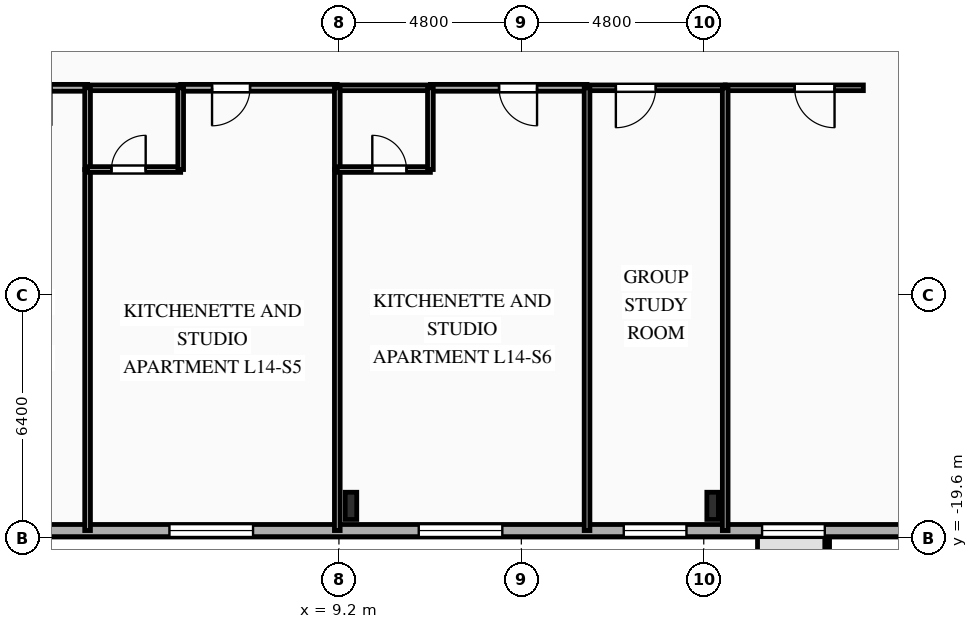
"""IFC4 building model, lengths in metres.
Left out: names, types, materials, properties, quantities, classifications, styles, units other than length and angle.
Written with IfcOpenShell. Run it as: python <this file> out.ifc"""

import sys

from ifc_helpers import new_model, si_unit, direction, frame, frame_2d, origin, origin_2d, place, context, subcontext, project, spatial, rectangle, i_section, extrude, element, fill, save


model = new_model("IFC4")
c1 = context("Model", 3, precision=1e-05, world=origin(), true_north=direction((0.0, 1.0)))
c2 = subcontext(c1, "Body", "Model", "MODEL_VIEW")
j1 = project(units=[si_unit("LENGTHUNIT", "METRE"), si_unit("PLANEANGLEUNIT", "RADIAN")], contexts=[c1])
p1 = place(None, origin())
s1 = spatial("IfcSite", under=j1, at=p1, CompositionType="ELEMENT")
p2 = place(p1, origin())
s2 = spatial("IfcBuilding", under=s1, at=p2, CompositionType="ELEMENT")
p3 = place(p2, frame((0.0, 0.0, 53.8)))
s3 = spatial("IfcBuildingStorey", under=s2, at=p3, CompositionType="ELEMENT", Elevation=53.8)
for number, where, z_axis, x_axis in (
    (1, (9.517, -18.75, 0.0), (0.0, 0.0, 1.0), (1.0, 0.0, 0.0)),
    (2, (19.033, -18.75, 0.0), (0.0, 0.0, 1.0), (1.0, 0.0, 0.0)),
):
    element("IfcColumn", number, at=place(p3, frame(where, z_axis=z_axis, x_axis=x_axis)), inside=s3, PredefinedType="COLUMN", context=c2, shape_type="SweptSolid", body=[
        extrude(i_section(OverallWidth=0.304, OverallDepth=0.716, WebThickness=0.021, FlangeThickness=0.04, FilletRadius=0.027, at=origin_2d()), origin(), (0.0, 0.0, 1.0), 3.35),
    ])
p4 = place(p3, frame((29.2, -19.4, 0.0), z_axis=(0.0, 0.0, 1.0), x_axis=(-1.0, 0.0, 0.0)))
e3 = element("IfcWall", 3, at=p4, inside=s3, PredefinedType="SOLIDWALL", context=c2, shape_type="SweptSolid", body=[
    extrude(rectangle(XDim=58.4, YDim=0.32, at=frame_2d((29.2, 0.0))), origin(), (0.0, 0.0, 1.0), 3.035),
])
p5 = place(p4, frame((7.215, 0.0, 0.85)))
e4 = element("IfcOpeningElement", 4, at=p5, cuts=e3, PredefinedType="OPENING", context=c2, shape_type="SweptSolid", body=[
    extrude(rectangle(XDim=1.65, YDim=1.85, at=frame_2d((0.825, 0.925))), frame((0.0, 0.17, 0.0), z_axis=(0.0, -1.0, 0.0), x_axis=(1.0, 0.0, 0.0)), (0.0, 0.0, 1.0), 0.34),
])
p6 = place(p4, frame((10.855, 0.0, 0.85)))
e5 = element("IfcOpeningElement", 5, at=p6, cuts=e3, PredefinedType="OPENING", context=c2, shape_type="SweptSolid", body=[
    extrude(rectangle(XDim=1.65, YDim=1.85, at=frame_2d((0.825, 0.925))), frame((0.0, 0.17, 0.0), z_axis=(0.0, -1.0, 0.0), x_axis=(1.0, 0.0, 0.0)), (0.0, 0.0, 1.0), 0.34),
])
p7 = place(p4, frame((15.7, 0.0, 0.85)))
e6 = element("IfcOpeningElement", 6, at=p7, cuts=e3, PredefinedType="OPENING", context=c2, shape_type="SweptSolid", body=[
    extrude(rectangle(XDim=2.2, YDim=1.85, at=frame_2d((1.1, 0.925))), frame((0.0, 0.17, 0.0), z_axis=(0.0, -1.0, 0.0), x_axis=(1.0, 0.0, 0.0)), (0.0, 0.0, 1.0), 0.34),
])
p8 = place(p4, frame((22.26, 0.0, 0.85)))
e7 = element("IfcOpeningElement", 7, at=p8, cuts=e3, PredefinedType="OPENING", context=c2, shape_type="SweptSolid", body=[
    extrude(rectangle(XDim=2.2, YDim=1.85, at=frame_2d((1.1, 0.925))), frame((0.0, 0.17, 0.0), z_axis=(0.0, -1.0, 0.0), x_axis=(1.0, 0.0, 0.0)), (0.0, 0.0, 1.0), 0.34),
])
p9 = place(p4, frame((29.408, 0.0, 0.85)))
e8 = element("IfcOpeningElement", 8, at=p9, cuts=e3, PredefinedType="OPENING", context=c2, shape_type="SweptSolid", body=[
    extrude(rectangle(XDim=2.2, YDim=1.85, at=frame_2d((1.1, 0.925))), frame((0.0, 0.17, 0.0), z_axis=(0.0, -1.0, 0.0), x_axis=(1.0, 0.0, 0.0)), (0.0, 0.0, 1.0), 0.34),
])
p10 = place(p4, frame((35.38, 0.0, 0.85)))
e9 = element("IfcOpeningElement", 9, at=p10, cuts=e3, PredefinedType="OPENING", context=c2, shape_type="SweptSolid", body=[
    extrude(rectangle(XDim=2.2, YDim=1.85, at=frame_2d((1.1, 0.925))), frame((0.0, 0.17, 0.0), z_axis=(0.0, -1.0, 0.0), x_axis=(1.0, 0.0, 0.0)), (0.0, 0.0, 1.0), 0.34),
])
p11 = place(p4, frame((41.98, 0.0, 0.85)))
e10 = element("IfcOpeningElement", 10, at=p11, cuts=e3, PredefinedType="OPENING", context=c2, shape_type="SweptSolid", body=[
    extrude(rectangle(XDim=2.2, YDim=1.85, at=frame_2d((1.1, 0.925))), frame((0.0, 0.17, 0.0), z_axis=(0.0, -1.0, 0.0), x_axis=(1.0, 0.0, 0.0)), (0.0, 0.0, 1.0), 0.34),
])
p12 = place(p4, frame((48.495, 0.0, 0.85)))
e11 = element("IfcOpeningElement", 11, at=p12, cuts=e3, PredefinedType="OPENING", context=c2, shape_type="SweptSolid", body=[
    extrude(rectangle(XDim=1.65, YDim=1.85, at=frame_2d((0.825, 0.925))), frame((0.0, 0.17, 0.0), z_axis=(0.0, -1.0, 0.0), x_axis=(1.0, 0.0, 0.0)), (0.0, 0.0, 1.0), 0.34),
])
p13 = place(p3, frame((2.586, -7.75, 0.0), z_axis=(0.0, 0.0, 1.0), x_axis=(-1.0, 0.0, 0.0)))
e12 = element("IfcWall", 12, at=p13, inside=s3, PredefinedType="PARTITIONING", context=c2, shape_type="SweptSolid", body=[
    extrude(rectangle(XDim=2.586, YDim=0.18, at=frame_2d((1.293, 0.0))), origin(), (0.0, 0.0, 1.0), 3.035),
])
p14 = place(p13, frame((0.953, 0.0, 0.0)))
e13 = element("IfcOpeningElement", 13, at=p14, cuts=e12, PredefinedType="OPENING", context=c2, shape_type="SweptSolid", body=[
    extrude(rectangle(XDim=1.0, YDim=2.15, at=frame_2d((0.5, 1.075))), frame((0.0, 0.1, 0.0), z_axis=(0.0, -1.0, 0.0), x_axis=(1.0, 0.0, 0.0)), (0.0, 0.0, 1.0), 0.2),
])
p15 = place(p3, frame((9.157, -7.75, 0.0), z_axis=(0.0, 0.0, 1.0), x_axis=(-1.0, 0.0, 0.0)))
e14 = element("IfcWall", 14, at=p15, inside=s3, PredefinedType="PARTITIONING", context=c2, shape_type="SweptSolid", body=[
    extrude(rectangle(XDim=4.121, YDim=0.18, at=frame_2d((2.061, 0.0))), origin(), (0.0, 0.0, 1.0), 3.035),
])
p16 = place(p15, frame((2.296, 0.0, 0.0)))
e15 = element("IfcOpeningElement", 15, at=p16, cuts=e14, PredefinedType="OPENING", context=c2, shape_type="SweptSolid", body=[
    extrude(rectangle(XDim=1.0, YDim=2.15, at=frame_2d((0.5, 1.075))), frame((0.0, 0.1, 0.0), z_axis=(0.0, -1.0, 0.0), x_axis=(1.0, 0.0, 0.0)), (0.0, 0.0, 1.0), 0.2),
])
p17 = place(p3, frame((5.036, -7.75, 0.0), z_axis=(0.0, 0.0, 1.0), x_axis=(-1.0, 0.0, 0.0)))
e16 = element("IfcWall", 16, at=p17, inside=s3, PredefinedType="PLUMBINGWALL", context=c2, shape_type="SweptSolid", body=[
    extrude(rectangle(XDim=2.45, YDim=0.15, at=frame_2d((1.225, 0.0))), origin(), (0.0, 0.0, 1.0), 3.035),
])
p18 = place(p3, frame((15.729, -7.75, 0.0), z_axis=(0.0, 0.0, 1.0), x_axis=(-1.0, 0.0, 0.0)))
e17 = element("IfcWall", 17, at=p18, inside=s3, PredefinedType="PARTITIONING", context=c2, shape_type="SweptSolid", body=[
    extrude(rectangle(XDim=4.122, YDim=0.18, at=frame_2d((2.061, 0.0))), origin(), (0.0, 0.0, 1.0), 3.035),
])
p19 = place(p18, frame((1.316, 0.0, 0.0)))
e18 = element("IfcOpeningElement", 18, at=p19, cuts=e17, PredefinedType="OPENING", context=c2, shape_type="SweptSolid", body=[
    extrude(rectangle(XDim=1.0, YDim=2.15, at=frame_2d((0.5, 1.075))), frame((0.0, 0.1, 0.0), z_axis=(0.0, -1.0, 0.0), x_axis=(1.0, 0.0, 0.0)), (0.0, 0.0, 1.0), 0.2),
])
p20 = place(p3, frame((11.607, -7.75, 0.0), z_axis=(0.0, 0.0, 1.0), x_axis=(-1.0, 0.0, 0.0)))
e19 = element("IfcWall", 19, at=p20, inside=s3, PredefinedType="PLUMBINGWALL", context=c2, shape_type="SweptSolid", body=[
    extrude(rectangle(XDim=2.45, YDim=0.15, at=frame_2d((1.225, 0.0))), origin(), (0.0, 0.0, 1.0), 3.035),
])
p21 = place(p3, frame((19.365, -7.75, 0.0), z_axis=(0.0, 0.0, 1.0), x_axis=(-1.0, 0.0, 0.0)))
e20 = element("IfcWall", 20, at=p21, inside=s3, PredefinedType="PARTITIONING", context=c2, shape_type="SweptSolid", body=[
    extrude(rectangle(XDim=3.635, YDim=0.15, at=frame_2d((1.818, 0.0))), origin(), (0.0, 0.0, 1.0), 3.035),
])
p22 = place(p21, frame((1.827, 0.0, 0.0)))
e21 = element("IfcOpeningElement", 21, at=p22, cuts=e20, PredefinedType="OPENING", context=c2, shape_type="SweptSolid", body=[
    extrude(rectangle(XDim=1.05, YDim=2.15, at=frame_2d((0.525, 1.075))), frame((0.0, 0.085, 0.0), z_axis=(0.0, -1.0, 0.0), x_axis=(1.0, 0.0, 0.0)), (0.0, 0.0, 1.0), 0.17),
])
p23 = place(p3, frame((23.0, -7.75, 0.0), z_axis=(0.0, 0.0, 1.0), x_axis=(-1.0, 0.0, 0.0)))
e22 = element("IfcWall", 22, at=p23, inside=s3, PredefinedType="PARTITIONING", context=c2, shape_type="SweptSolid", body=[
    extrude(rectangle(XDim=3.635, YDim=0.15, at=frame_2d((1.818, 0.0))), origin(), (0.0, 0.0, 1.0), 3.035),
])
p24 = place(p23, frame((0.758, 0.0, 0.0)))
e23 = element("IfcOpeningElement", 23, at=p24, cuts=e22, PredefinedType="OPENING", context=c2, shape_type="SweptSolid", body=[
    extrude(rectangle(XDim=1.05, YDim=2.15, at=frame_2d((0.525, 1.075))), frame((0.0, 0.085, 0.0), z_axis=(0.0, -1.0, 0.0), x_axis=(1.0, 0.0, 0.0)), (0.0, 0.0, 1.0), 0.17),
])
p25 = place(p3, frame((2.586, -9.9, 0.0), z_axis=(0.0, 0.0, 1.0), x_axis=(0.0, -1.0, 0.0)))
e24 = element("IfcWall", 24, at=p25, inside=s3, PredefinedType="PARTITIONING", context=c2, shape_type="SweptSolid", body=[
    extrude(rectangle(XDim=9.5, YDim=0.15, at=frame_2d((4.75, 0.0))), origin(), (0.0, 0.0, 1.0), 3.035),
])
p26 = place(p3, frame((2.586, -7.75, 0.0), z_axis=(0.0, 0.0, 1.0), x_axis=(0.0, -1.0, 0.0)))
e25 = element("IfcWall", 25, at=p26, inside=s3, PredefinedType="PLUMBINGWALL", context=c2, shape_type="SweptSolid", body=[
    extrude(rectangle(XDim=2.15, YDim=0.15, at=frame_2d((1.075, 0.0))), origin(), (0.0, 0.0, 1.0), 3.035),
])
p27 = place(p3, frame((2.586, -9.9, 0.0), z_axis=(0.0, 0.0, 1.0), x_axis=(1.0, 0.0, 0.0)))
e26 = element("IfcWall", 26, at=p27, inside=s3, PredefinedType="PLUMBINGWALL", context=c2, shape_type="SweptSolid", body=[
    extrude(rectangle(XDim=2.45, YDim=0.15, at=frame_2d((1.225, 0.0))), origin(), (0.0, 0.0, 1.0), 3.035),
])
p28 = place(p27, frame((0.629, 0.0, 0.0)))
e27 = element("IfcOpeningElement", 27, at=p28, cuts=e26, PredefinedType="OPENING", context=c2, shape_type="SweptSolid", body=[
    extrude(rectangle(XDim=0.9, YDim=2.1, at=frame_2d((0.45, 1.05))), frame((0.0, 0.085, 0.0), z_axis=(0.0, -1.0, 0.0), x_axis=(1.0, 0.0, 0.0)), (0.0, 0.0, 1.0), 0.17),
])
p29 = place(p3, frame((5.036, -9.9, 0.0), z_axis=(0.0, 0.0, 1.0), x_axis=(0.0, 1.0, 0.0)))
e28 = element("IfcWall", 28, at=p29, inside=s3, PredefinedType="PLUMBINGWALL", context=c2, shape_type="SweptSolid", body=[
    extrude(rectangle(XDim=2.15, YDim=0.15, at=frame_2d((1.075, 0.0))), origin(), (0.0, 0.0, 1.0), 3.035),
])
p30 = place(p3, frame((9.157, -9.9, 0.0), z_axis=(0.0, 0.0, 1.0), x_axis=(0.0, -1.0, 0.0)))
e29 = element("IfcWall", 29, at=p30, inside=s3, PredefinedType="PARTITIONING", context=c2, shape_type="SweptSolid", body=[
    extrude(rectangle(XDim=9.5, YDim=0.15, at=frame_2d((4.75, 0.0))), origin(), (0.0, 0.0, 1.0), 2.52),
])
p31 = place(p3, frame((9.157, -7.75, 0.0), z_axis=(0.0, 0.0, 1.0), x_axis=(0.0, -1.0, 0.0)))
e30 = element("IfcWall", 30, at=p31, inside=s3, PredefinedType="PLUMBINGWALL", context=c2, shape_type="SweptSolid", body=[
    extrude(rectangle(XDim=2.15, YDim=0.15, at=frame_2d((1.075, 0.0))), origin(), (0.0, 0.0, 1.0), 2.52),
])
p32 = place(p3, frame((9.157, -9.9, 0.0), z_axis=(0.0, 0.0, 1.0), x_axis=(1.0, 0.0, 0.0)))
e31 = element("IfcWall", 31, at=p32, inside=s3, PredefinedType="PLUMBINGWALL", context=c2, shape_type="SweptSolid", body=[
    extrude(rectangle(XDim=2.45, YDim=0.15, at=frame_2d((1.225, 0.0))), origin(), (0.0, 0.0, 1.0), 3.035),
])
p33 = place(p32, frame((0.921, 0.0, 0.0)))
e32 = element("IfcOpeningElement", 32, at=p33, cuts=e31, PredefinedType="OPENING", context=c2, shape_type="SweptSolid", body=[
    extrude(rectangle(XDim=0.9, YDim=2.1, at=frame_2d((0.45, 1.05))), frame((0.0, 0.085, 0.0), z_axis=(0.0, -1.0, 0.0), x_axis=(1.0, 0.0, 0.0)), (0.0, 0.0, 1.0), 0.17),
])
p34 = place(p3, frame((11.607, -9.9, 0.0), z_axis=(0.0, 0.0, 1.0), x_axis=(0.0, 1.0, 0.0)))
e33 = element("IfcWall", 33, at=p34, inside=s3, PredefinedType="PLUMBINGWALL", context=c2, shape_type="SweptSolid", body=[
    extrude(rectangle(XDim=2.15, YDim=0.15, at=frame_2d((1.075, 0.0))), origin(), (0.0, 0.0, 1.0), 3.035),
])
for number, where, z_axis, x_axis in (
    (34, (15.729, -7.75, 0.0), (0.0, 0.0, 1.0), (0.0, -1.0, 0.0)),
    (35, (19.365, -7.75, 0.0), (0.0, 0.0, 1.0), (0.0, -1.0, 0.0)),
):
    element("IfcWall", number, at=place(p3, frame(where, z_axis=z_axis, x_axis=x_axis)), inside=s3, PredefinedType="PARTITIONING", context=c2, shape_type="SweptSolid", body=[
        extrude(rectangle(XDim=11.65, YDim=0.15, at=frame_2d((5.825, 0.0))), origin(), (0.0, 0.0, 1.0), 3.035),
    ])
p35 = place(p5, origin())
e36 = element("IfcWindow", 36, at=p35, inside=s3, PartitioningType="SINGLE_PANEL", PredefinedType="WINDOW", context=c2, shape_type="SweptSolid", body=[
    extrude(rectangle(XDim=1.65, YDim=1.85, at=frame_2d((0.825, 0.925))), frame((0.0, 0.03, 0.0), z_axis=(0.0, -1.0, 0.0), x_axis=(1.0, 0.0, 0.0)), (0.0, 0.0, 1.0), 0.06),
])
fill(e4, e36)
p36 = place(p6, origin())
e37 = element("IfcWindow", 37, at=p36, inside=s3, PartitioningType="SINGLE_PANEL", PredefinedType="WINDOW", context=c2, shape_type="SweptSolid", body=[
    extrude(rectangle(XDim=1.65, YDim=1.85, at=frame_2d((0.825, 0.925))), frame((0.0, 0.03, 0.0), z_axis=(0.0, -1.0, 0.0), x_axis=(1.0, 0.0, 0.0)), (0.0, 0.0, 1.0), 0.06),
])
fill(e5, e37)
p37 = place(p7, origin())
e38 = element("IfcWindow", 38, at=p37, inside=s3, PartitioningType="SINGLE_PANEL", PredefinedType="WINDOW", context=c2, shape_type="SweptSolid", body=[
    extrude(rectangle(XDim=2.2, YDim=1.85, at=frame_2d((1.1, 0.925))), frame((0.0, 0.03, 0.0), z_axis=(0.0, -1.0, 0.0), x_axis=(1.0, 0.0, 0.0)), (0.0, 0.0, 1.0), 0.06),
])
fill(e6, e38)
p38 = place(p8, origin())
e39 = element("IfcWindow", 39, at=p38, inside=s3, PartitioningType="SINGLE_PANEL", PredefinedType="WINDOW", context=c2, shape_type="SweptSolid", body=[
    extrude(rectangle(XDim=2.2, YDim=1.85, at=frame_2d((1.1, 0.925))), frame((0.0, 0.03, 0.0), z_axis=(0.0, -1.0, 0.0), x_axis=(1.0, 0.0, 0.0)), (0.0, 0.0, 1.0), 0.06),
])
fill(e7, e39)
p39 = place(p16, origin())
e40 = element("IfcDoor", 40, at=p39, inside=s3, OperationType="SINGLE_SWING_RIGHT", PredefinedType="DOOR", context=c2, shape_type="SweptSolid", body=[
    extrude(rectangle(XDim=1.0, YDim=2.15, at=frame_2d((0.5, 1.075))), frame((0.0, 0.025, 0.0), z_axis=(0.0, -1.0, 0.0), x_axis=(1.0, 0.0, 0.0)), (0.0, 0.0, 1.0), 0.05),
])
fill(e15, e40)
p40 = place(p19, origin())
e41 = element("IfcDoor", 41, at=p40, inside=s3, OperationType="SINGLE_SWING_LEFT", PredefinedType="DOOR", context=c2, shape_type="SweptSolid", body=[
    extrude(rectangle(XDim=1.0, YDim=2.15, at=frame_2d((0.5, 1.075))), frame((0.0, 0.025, 0.0), z_axis=(0.0, -1.0, 0.0), x_axis=(1.0, 0.0, 0.0)), (0.0, 0.0, 1.0), 0.05),
])
fill(e18, e41)
p41 = place(p22, origin())
e42 = element("IfcDoor", 42, at=p41, inside=s3, OperationType="SINGLE_SWING_RIGHT", PredefinedType="DOOR", context=c2, shape_type="SweptSolid", body=[
    extrude(rectangle(XDim=1.05, YDim=2.15, at=frame_2d((0.525, 1.075))), frame((0.0, 0.025, 0.0), z_axis=(0.0, -1.0, 0.0), x_axis=(1.0, 0.0, 0.0)), (0.0, 0.0, 1.0), 0.05),
])
fill(e21, e42)
p42 = place(p24, origin())
e43 = element("IfcDoor", 43, at=p42, inside=s3, OperationType="SINGLE_SWING_LEFT", PredefinedType="DOOR", context=c2, shape_type="SweptSolid", body=[
    extrude(rectangle(XDim=1.05, YDim=2.15, at=frame_2d((0.525, 1.075))), frame((0.0, 0.025, 0.0), z_axis=(0.0, -1.0, 0.0), x_axis=(1.0, 0.0, 0.0)), (0.0, 0.0, 1.0), 0.05),
])
fill(e23, e43)
p43 = place(p28, origin())
e44 = element("IfcDoor", 44, at=p43, inside=s3, OperationType="SINGLE_SWING_RIGHT", PredefinedType="DOOR", context=c2, shape_type="SweptSolid", body=[
    extrude(rectangle(XDim=0.9, YDim=2.1, at=frame_2d((0.45, 1.05))), frame((0.0, 0.025, 0.0), z_axis=(0.0, -1.0, 0.0), x_axis=(1.0, 0.0, 0.0)), (0.0, 0.0, 1.0), 0.05),
])
fill(e27, e44)
p44 = place(p33, origin())
e45 = element("IfcDoor", 45, at=p44, inside=s3, OperationType="SINGLE_SWING_LEFT", PredefinedType="DOOR", context=c2, shape_type="SweptSolid", body=[
    extrude(rectangle(XDim=0.9, YDim=2.1, at=frame_2d((0.45, 1.05))), frame((0.0, 0.025, 0.0), z_axis=(0.0, -1.0, 0.0), x_axis=(1.0, 0.0, 0.0)), (0.0, 0.0, 1.0), 0.05),
])
fill(e32, e45)
save(model, sys.argv[1])
